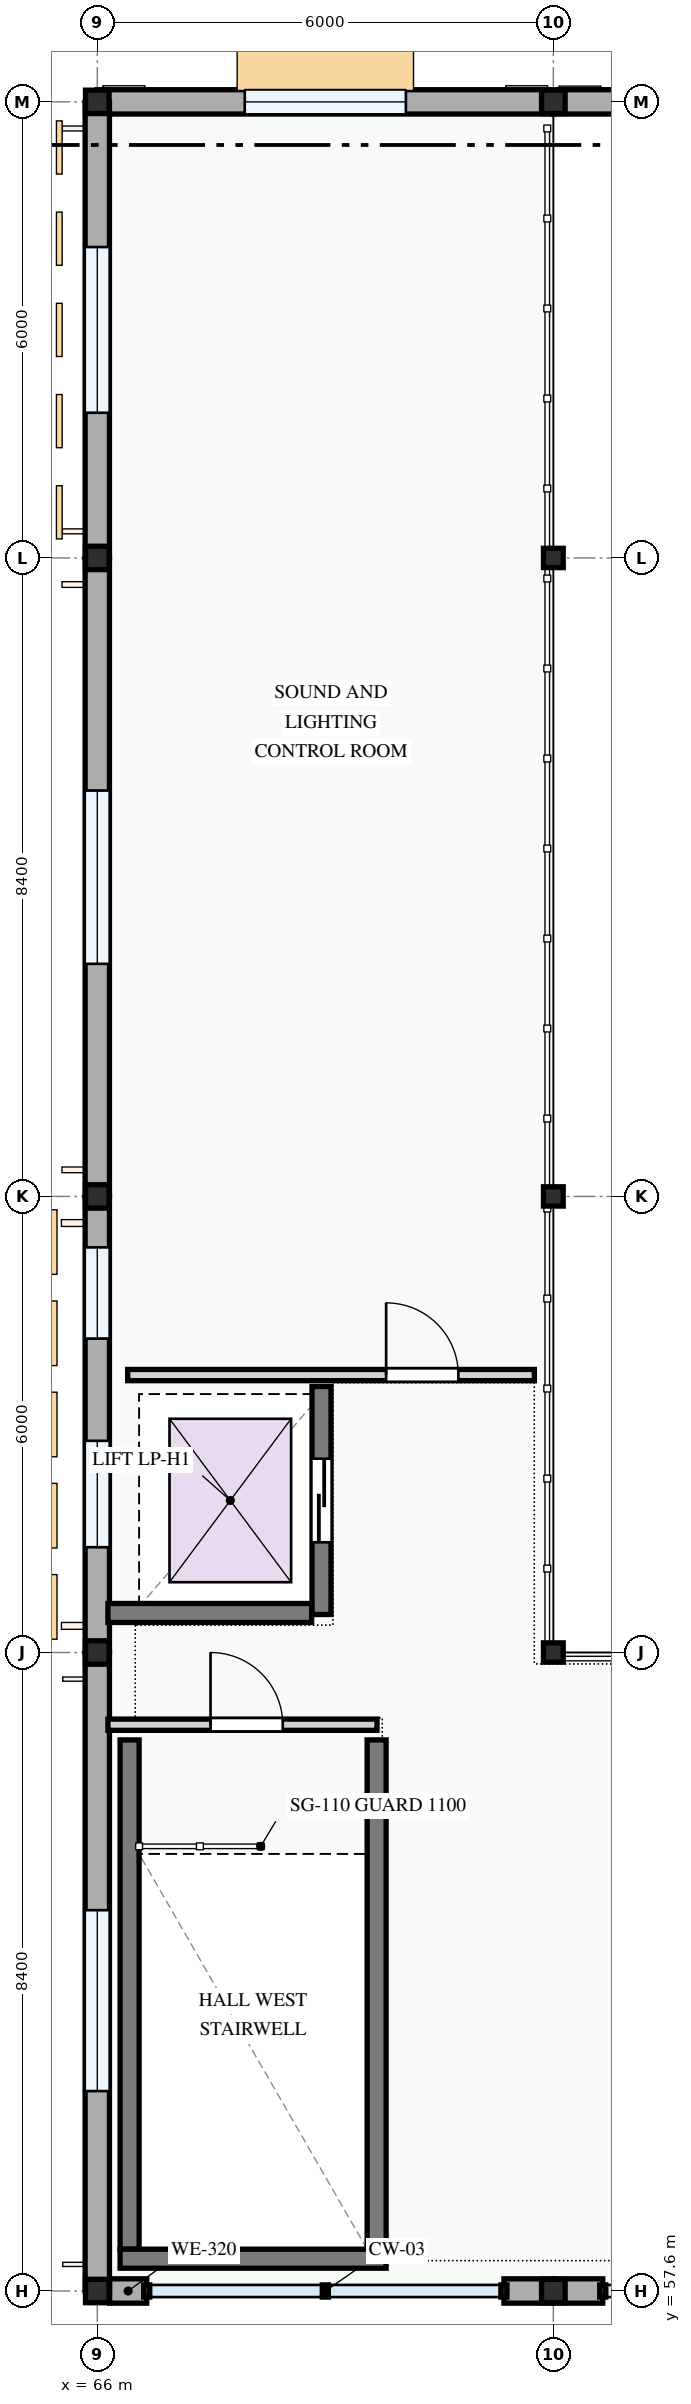
"""IFC4 building model, lengths in metres.
Left out: names, types, materials, properties, quantities, classifications, styles, units other than length and angle.
Written with IfcOpenShell. Run it as: python <this file> out.ifc"""

import sys

from ifc_helpers import new_model, si_unit, direction, frame, frame_2d, origin, origin_2d, place, context, subcontext, project, spatial, rectangle, i_section, extrude, element, fill, save


model = new_model("IFC4")
c1 = context("Model", 3, precision=1e-05, world=origin(), true_north=direction((0.0, 1.0)))
c2 = subcontext(c1, "Body", "Model", "MODEL_VIEW")
j1 = project(units=[si_unit("LENGTHUNIT", "METRE"), si_unit("PLANEANGLEUNIT", "RADIAN")], contexts=[c1])
p1 = place(None, origin())
s1 = spatial("IfcSite", under=j1, at=p1, CompositionType="ELEMENT")
p2 = place(p1, origin())
s2 = spatial("IfcBuilding", under=s1, at=p2, CompositionType="ELEMENT")
p3 = place(p2, frame((0.0, 0.0, 4.5)))
s3 = spatial("IfcBuildingStorey", under=s2, at=p3, CompositionType="ELEMENT", Elevation=4.5)
for number, where, z_axis, x_axis in (
    (1, (66.0, 57.6, 0.0), (0.0, 0.0, 1.0), (1.0, 0.0, 0.0)),
    (2, (66.0, 66.0, 0.0), (0.0, 0.0, 1.0), (1.0, 0.0, 0.0)),
    (3, (66.0, 72.0, 0.0), (0.0, 0.0, 1.0), (1.0, 0.0, 0.0)),
    (4, (66.0, 80.4, 0.0), (0.0, 0.0, 1.0), (1.0, 0.0, 0.0)),
    (5, (66.0, 86.4, 0.0), (0.0, 0.0, 1.0), (1.0, 0.0, 0.0)),
    (6, (72.0, 57.6, 0.0), (0.0, 0.0, 1.0), (1.0, 0.0, 0.0)),
):
    element("IfcColumn", number, at=place(p3, frame(where, z_axis=z_axis, x_axis=x_axis)), inside=s3, PredefinedType="COLUMN", context=c2, shape_type="SweptSolid", body=[
        extrude(i_section(OverallWidth=0.31, OverallDepth=0.308, WebThickness=0.015, FlangeThickness=0.015, FilletRadius=0.012, at=origin_2d()), origin(), (0.0, 0.0, 1.0), 3.6),
    ])
for number, where, z_axis, x_axis in (
    (7, (72.0, 66.0, 0.0), (0.0, 0.0, 1.0), (1.0, 0.0, 0.0)),
    (8, (72.0, 72.0, 0.0), (0.0, 0.0, 1.0), (1.0, 0.0, 0.0)),
    (9, (72.0, 80.4, 0.0), (0.0, 0.0, 1.0), (1.0, 0.0, 0.0)),
):
    element("IfcColumn", number, at=place(p3, frame(where, z_axis=z_axis, x_axis=x_axis)), inside=s3, PredefinedType="COLUMN", context=c2, shape_type="SweptSolid", body=[
        extrude(i_section(OverallWidth=0.26, OverallDepth=0.254, WebThickness=0.014, FlangeThickness=0.014, FilletRadius=0.01, at=origin_2d()), origin(), (0.0, 0.0, 1.0), 3.6),
    ])
p4 = place(p3, frame((72.0, 86.4, 0.0), z_axis=(0.0, 0.0, 1.0), x_axis=(1.0, 0.0, 0.0)))
e10 = element("IfcColumn", 10, at=p4, inside=s3, PredefinedType="COLUMN", context=c2, shape_type="SweptSolid", body=[
    extrude(i_section(OverallWidth=0.31, OverallDepth=0.308, WebThickness=0.015, FlangeThickness=0.015, FilletRadius=0.012, at=origin_2d()), origin(), (0.0, 0.0, 1.0), 3.6),
])
p5 = place(p3, frame((66.162, 57.6, 0.0), z_axis=(0.0, 0.0, 1.0), x_axis=(1.0, 0.0, 0.0)))
e11 = element("IfcWall", 11, at=p5, inside=s3, PredefinedType="STANDARD", context=c2, shape_type="SweptSolid", body=[
    extrude(rectangle(XDim=0.488, YDim=0.32, at=frame_2d((0.244, 0.0))), origin(), (0.0, 0.0, 1.0), 2.862),
])
p6 = place(p3, frame((71.35, 57.6, 0.0), z_axis=(0.0, 0.0, 1.0), x_axis=(1.0, 0.0, 0.0)))
e12 = element("IfcWall", 12, at=p6, inside=s3, PredefinedType="STANDARD", context=c2, shape_type="SweptSolid", body=[
    extrude(rectangle(XDim=0.65, YDim=0.32, at=frame_2d((0.325, 0.0))), origin(), (0.0, 0.0, 1.0), 2.862),
])
p7 = place(p3, frame((72.0, 57.6, 0.0), z_axis=(0.0, 0.0, 1.0), x_axis=(1.0, 0.0, 0.0)))
e13 = element("IfcWall", 13, at=p7, inside=s3, PredefinedType="STANDARD", context=c2, shape_type="SweptSolid", body=[
    extrude(rectangle(XDim=0.65, YDim=0.32, at=frame_2d((0.325, 0.0))), origin(), (0.0, 0.0, 1.0), 2.786),
])
p8 = place(p3, frame((80.4, 86.4, 0.0), z_axis=(0.0, 0.0, 1.0), x_axis=(-1.0, 0.0, 0.0)))
e14 = element("IfcWall", 14, at=p8, inside=s3, PredefinedType="STANDARD", context=c2, shape_type="SweptSolid", body=[
    extrude(rectangle(XDim=8.4, YDim=0.32, at=frame_2d((4.2, 0.0))), origin(), (0.0, 0.0, 1.0), 2.786),
])
p9 = place(p8, frame((3.18, 0.0, 0.85)))
e15 = element("IfcOpeningElement", 15, at=p9, cuts=e14, PredefinedType="OPENING", context=c2, shape_type="SweptSolid", body=[
    extrude(rectangle(XDim=2.04, YDim=1.46, at=frame_2d((1.02, 0.73))), frame((0.0, 0.17, 0.0), z_axis=(0.0, -1.0, 0.0), x_axis=(1.0, 0.0, 0.0)), (0.0, 0.0, 1.0), 0.34),
])
p10 = place(p3, frame((72.0, 86.4, 0.0), z_axis=(0.0, 0.0, 1.0), x_axis=(-1.0, 0.0, 0.0)))
e16 = element("IfcWall", 16, at=p10, inside=s3, PredefinedType="STANDARD", context=c2, shape_type="SweptSolid", body=[
    extrude(rectangle(XDim=6.0, YDim=0.32, at=frame_2d((3.0, 0.0))), origin(), (0.0, 0.0, 1.0), 2.862),
])
p11 = place(p10, frame((1.94, 0.0, 0.85)))
e17 = element("IfcOpeningElement", 17, at=p11, cuts=e16, PredefinedType="OPENING", context=c2, shape_type="SweptSolid", body=[
    extrude(rectangle(XDim=2.12, YDim=1.44, at=frame_2d((1.06, 0.72))), frame((0.0, 0.17, 0.0), z_axis=(0.0, -1.0, 0.0), x_axis=(1.0, 0.0, 0.0)), (0.0, 0.0, 1.0), 0.34),
])
p12 = place(p3, frame((66.0, 86.4, 0.0), z_axis=(0.0, 0.0, 1.0), x_axis=(0.0, -1.0, 0.0)))
e18 = element("IfcWall", 18, at=p12, inside=s3, PredefinedType="STANDARD", context=c2, shape_type="SweptSolid", body=[
    extrude(rectangle(XDim=6.0, YDim=0.32, at=frame_2d((3.0, 0.0))), origin(), (0.0, 0.0, 1.0), 2.912),
])
p13 = place(p12, frame((1.91, 0.0, 0.85)))
e19 = element("IfcOpeningElement", 19, at=p13, cuts=e18, PredefinedType="OPENING", context=c2, shape_type="SweptSolid", body=[
    extrude(rectangle(XDim=2.18, YDim=1.48, at=frame_2d((1.09, 0.74))), frame((0.0, 0.17, 0.0), z_axis=(0.0, -1.0, 0.0), x_axis=(1.0, 0.0, 0.0)), (0.0, 0.0, 1.0), 0.34),
])
p14 = place(p3, frame((66.0, 80.4, 0.0), z_axis=(0.0, 0.0, 1.0), x_axis=(0.0, -1.0, 0.0)))
e20 = element("IfcWall", 20, at=p14, inside=s3, PredefinedType="STANDARD", context=c2, shape_type="SweptSolid", body=[
    extrude(rectangle(XDim=8.4, YDim=0.32, at=frame_2d((4.2, 0.0))), origin(), (0.0, 0.0, 1.0), 2.79),
])
p15 = place(p14, frame((3.06, 0.0, 0.85)))
e21 = element("IfcOpeningElement", 21, at=p15, cuts=e20, PredefinedType="OPENING", context=c2, shape_type="SweptSolid", body=[
    extrude(rectangle(XDim=2.28, YDim=1.46, at=frame_2d((1.14, 0.73))), frame((0.0, 0.17, 0.0), z_axis=(0.0, -1.0, 0.0), x_axis=(1.0, 0.0, 0.0)), (0.0, 0.0, 1.0), 0.34),
])
p16 = place(p3, frame((66.0, 72.0, 0.0), z_axis=(0.0, 0.0, 1.0), x_axis=(0.0, -1.0, 0.0)))
e22 = element("IfcWall", 22, at=p16, inside=s3, PredefinedType="STANDARD", context=c2, shape_type="SweptSolid", body=[
    extrude(rectangle(XDim=6.0, YDim=0.32, at=frame_2d((3.0, 0.0))), origin(), (0.0, 0.0, 1.0), 2.912),
])
p17 = place(p16, frame((0.67, 0.0, 0.85)))
e23 = element("IfcOpeningElement", 23, at=p17, cuts=e22, PredefinedType="OPENING", context=c2, shape_type="SweptSolid", body=[
    extrude(rectangle(XDim=1.2, YDim=1.5, at=frame_2d((0.6, 0.75))), frame((0.0, 0.17, 0.0), z_axis=(0.0, -1.0, 0.0), x_axis=(1.0, 0.0, 0.0)), (0.0, 0.0, 1.0), 0.34),
])
p18 = place(p16, frame((3.215, 0.0, 0.85)))
e24 = element("IfcOpeningElement", 24, at=p18, cuts=e22, PredefinedType="OPENING", context=c2, shape_type="SweptSolid", body=[
    extrude(rectangle(XDim=1.4, YDim=1.45, at=frame_2d((0.7, 0.725))), frame((0.0, 0.17, 0.0), z_axis=(0.0, -1.0, 0.0), x_axis=(1.0, 0.0, 0.0)), (0.0, 0.0, 1.0), 0.34),
])
p19 = place(p3, frame((66.0, 66.0, 0.0), z_axis=(0.0, 0.0, 1.0), x_axis=(0.0, -1.0, 0.0)))
e25 = element("IfcWall", 25, at=p19, inside=s3, PredefinedType="STANDARD", context=c2, shape_type="SweptSolid", body=[
    extrude(rectangle(XDim=8.4, YDim=0.32, at=frame_2d((4.2, 0.0))), origin(), (0.0, 0.0, 1.0), 2.79),
])
p20 = place(p19, frame((3.39, 0.0, 0.85)))
e26 = element("IfcOpeningElement", 26, at=p20, cuts=e25, PredefinedType="OPENING", context=c2, shape_type="SweptSolid", body=[
    extrude(rectangle(XDim=2.38, YDim=1.48, at=frame_2d((1.19, 0.74))), frame((0.0, 0.17, 0.0), z_axis=(0.0, -1.0, 0.0), x_axis=(1.0, 0.0, 0.0)), (0.0, 0.0, 1.0), 0.34),
])
for number, where, z_axis, x_axis in (
    (27, (66.425, 64.85, 0.0), (0.0, 0.0, 1.0), (0.0, -1.0, 0.0)),
    (28, (69.675, 64.85, 0.0), (0.0, 0.0, 1.0), (0.0, -1.0, 0.0)),
):
    element("IfcWall", number, at=place(p3, frame(where, z_axis=z_axis, x_axis=x_axis)), inside=s3, PredefinedType="SHEAR", context=c2, shape_type="SweptSolid", body=[
        extrude(rectangle(XDim=6.7, YDim=0.25, at=frame_2d((3.35, 0.0))), origin(), (0.0, 0.0, 1.0), 3.3),
    ])
p21 = place(p3, frame((66.3, 58.025, 0.0), z_axis=(0.0, 0.0, 1.0), x_axis=(1.0, 0.0, 0.0)))
e29 = element("IfcWall", 29, at=p21, inside=s3, PredefinedType="SHEAR", context=c2, shape_type="SweptSolid", body=[
    extrude(rectangle(XDim=3.5, YDim=0.25, at=frame_2d((1.75, 0.0))), origin(), (0.0, 0.0, 1.0), 3.3),
])
p22 = place(p3, frame((66.4, 69.65, 0.0), z_axis=(0.0, 0.0, 1.0), x_axis=(1.0, 0.0, 0.0)))
e30 = element("IfcWall", 30, at=p22, inside=s3, PredefinedType="PARTITIONING", context=c2, shape_type="SweptSolid", body=[
    extrude(rectangle(XDim=5.35, YDim=0.148, at=frame_2d((2.675, 0.0))), origin(), (0.0, 0.0, 1.0), 3.3),
])
p23 = place(p22, frame((3.4, 0.0, 0.0)))
e31 = element("IfcOpeningElement", 31, at=p23, cuts=e30, PredefinedType="OPENING", context=c2, shape_type="SweptSolid", body=[
    extrude(rectangle(XDim=0.95, YDim=2.1, at=frame_2d((0.475, 1.05))), frame((0.0, 0.084, 0.0), z_axis=(0.0, -1.0, 0.0), x_axis=(1.0, 0.0, 0.0)), (0.0, 0.0, 1.0), 0.168),
])
p24 = place(p3, frame((68.95, 66.5, 0.0), z_axis=(0.0, 0.0, 1.0), x_axis=(0.0, 1.0, 0.0)))
e32 = element("IfcWall", 32, at=p24, inside=s3, PredefinedType="SHEAR", context=c2, shape_type="SweptSolid", body=[
    extrude(rectangle(XDim=3.0, YDim=0.25, at=frame_2d((1.5, 0.0))), origin(), (0.0, 0.0, 1.0), 3.3),
])
p25 = place(p24, frame((0.95, 0.0, 0.0)))
e33 = element("IfcOpeningElement", 33, at=p25, cuts=e32, PredefinedType="OPENING", context=c2, shape_type="SweptSolid", body=[
    extrude(rectangle(XDim=1.1, YDim=2.15, at=frame_2d((0.55, 1.075))), frame((0.0, 0.135, 0.0), z_axis=(0.0, -1.0, 0.0), x_axis=(1.0, 0.0, 0.0)), (0.0, 0.0, 1.0), 0.27),
])
p26 = place(p3, frame((66.14, 66.52, 0.0), z_axis=(0.0, 0.0, 1.0), x_axis=(1.0, 0.0, 0.0)))
e34 = element("IfcWall", 34, at=p26, inside=s3, PredefinedType="SHEAR", context=c2, shape_type="SweptSolid", body=[
    extrude(rectangle(XDim=2.68, YDim=0.25, at=frame_2d((1.34, 0.0))), origin(), (0.0, 0.0, 1.0), 3.3),
])
p27 = place(p3, frame((66.14, 65.05, 0.0), z_axis=(0.0, 0.0, 1.0), x_axis=(1.0, 0.0, 0.0)))
e35 = element("IfcWall", 35, at=p27, inside=s3, PredefinedType="PARTITIONING", context=c2, shape_type="SweptSolid", body=[
    extrude(rectangle(XDim=3.54, YDim=0.148, at=frame_2d((1.77, 0.0))), origin(), (0.0, 0.0, 1.0), 3.3),
])
p28 = place(p27, frame((1.35, 0.0, 0.0)))
e36 = element("IfcOpeningElement", 36, at=p28, cuts=e35, PredefinedType="OPENING", context=c2, shape_type="SweptSolid", body=[
    extrude(rectangle(XDim=0.95, YDim=2.1, at=frame_2d((0.475, 1.05))), frame((0.0, 0.084, 0.0), z_axis=(0.0, -1.0, 0.0), x_axis=(1.0, 0.0, 0.0)), (0.0, 0.0, 1.0), 0.168),
])
p29 = place(p11, origin())
e37 = element("IfcWindow", 37, at=p29, inside=s3, PartitioningType="DOUBLE_PANEL_VERTICAL", PredefinedType="WINDOW", context=c2, shape_type="SweptSolid", body=[
    extrude(rectangle(XDim=2.12, YDim=1.44, at=frame_2d((1.06, 0.72))), frame((0.0, 0.03, 0.0), z_axis=(0.0, -1.0, 0.0), x_axis=(1.0, 0.0, 0.0)), (0.0, 0.0, 1.0), 0.06),
])
fill(e17, e37)
p30 = place(p13, origin())
e38 = element("IfcWindow", 38, at=p30, inside=s3, PartitioningType="DOUBLE_PANEL_VERTICAL", PredefinedType="WINDOW", context=c2, shape_type="SweptSolid", body=[
    extrude(rectangle(XDim=2.18, YDim=1.48, at=frame_2d((1.09, 0.74))), frame((0.0, 0.03, 0.0), z_axis=(0.0, -1.0, 0.0), x_axis=(1.0, 0.0, 0.0)), (0.0, 0.0, 1.0), 0.06),
])
fill(e19, e38)
p31 = place(p15, origin())
e39 = element("IfcWindow", 39, at=p31, inside=s3, PartitioningType="DOUBLE_PANEL_VERTICAL", PredefinedType="WINDOW", context=c2, shape_type="SweptSolid", body=[
    extrude(rectangle(XDim=2.28, YDim=1.46, at=frame_2d((1.14, 0.73))), frame((0.0, 0.03, 0.0), z_axis=(0.0, -1.0, 0.0), x_axis=(1.0, 0.0, 0.0)), (0.0, 0.0, 1.0), 0.06),
])
fill(e21, e39)
p32 = place(p17, origin())
e40 = element("IfcWindow", 40, at=p32, inside=s3, PartitioningType="SINGLE_PANEL", PredefinedType="WINDOW", context=c2, shape_type="SweptSolid", body=[
    extrude(rectangle(XDim=1.2, YDim=1.5, at=frame_2d((0.6, 0.75))), frame((0.0, 0.03, 0.0), z_axis=(0.0, -1.0, 0.0), x_axis=(1.0, 0.0, 0.0)), (0.0, 0.0, 1.0), 0.06),
])
fill(e23, e40)
p33 = place(p18, origin())
e41 = element("IfcWindow", 41, at=p33, inside=s3, PartitioningType="SINGLE_PANEL", PredefinedType="WINDOW", context=c2, shape_type="SweptSolid", body=[
    extrude(rectangle(XDim=1.4, YDim=1.45, at=frame_2d((0.7, 0.725))), frame((0.0, 0.03, 0.0), z_axis=(0.0, -1.0, 0.0), x_axis=(1.0, 0.0, 0.0)), (0.0, 0.0, 1.0), 0.06),
])
fill(e24, e41)
p34 = place(p20, origin())
e42 = element("IfcWindow", 42, at=p34, inside=s3, PartitioningType="DOUBLE_PANEL_VERTICAL", PredefinedType="WINDOW", context=c2, shape_type="SweptSolid", body=[
    extrude(rectangle(XDim=2.38, YDim=1.48, at=frame_2d((1.19, 0.74))), frame((0.0, 0.03, 0.0), z_axis=(0.0, -1.0, 0.0), x_axis=(1.0, 0.0, 0.0)), (0.0, 0.0, 1.0), 0.06),
])
fill(e26, e42)
p35 = place(p23, origin())
e43 = element("IfcDoor", 43, at=p35, inside=s3, OperationType="SINGLE_SWING_LEFT", PredefinedType="DOOR", context=c2, shape_type="SweptSolid", body=[
    extrude(rectangle(XDim=0.95, YDim=2.1, at=frame_2d((0.475, 1.05))), frame((0.0, 0.025, 0.0), z_axis=(0.0, -1.0, 0.0), x_axis=(1.0, 0.0, 0.0)), (0.0, 0.0, 1.0), 0.05),
])
fill(e31, e43)
p36 = place(p25, origin())
e44 = element("IfcDoor", 44, at=p36, inside=s3, OperationType="SLIDING_TO_LEFT", PredefinedType="DOOR", context=c2, shape_type="SweptSolid", body=[
    extrude(rectangle(XDim=1.1, YDim=2.15, at=frame_2d((0.55, 1.075))), frame((0.0, 0.025, 0.0), z_axis=(0.0, -1.0, 0.0), x_axis=(1.0, 0.0, 0.0)), (0.0, 0.0, 1.0), 0.05),
])
fill(e33, e44)
p37 = place(p28, origin())
e45 = element("IfcDoor", 45, at=p37, inside=s3, OperationType="SINGLE_SWING_LEFT", PredefinedType="DOOR", context=c2, shape_type="SweptSolid", body=[
    extrude(rectangle(XDim=0.95, YDim=2.1, at=frame_2d((0.475, 1.05))), frame((0.0, 0.025, 0.0), z_axis=(0.0, -1.0, 0.0), x_axis=(1.0, 0.0, 0.0)), (0.0, 0.0, 1.0), 0.05),
])
fill(e36, e45)
save(model, sys.argv[1])
